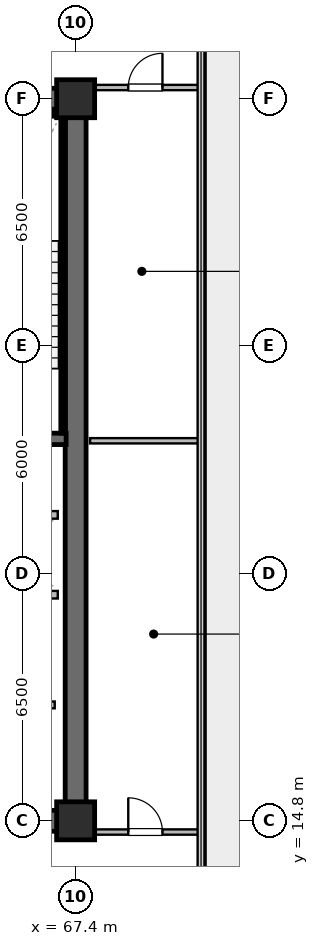
"""IFC4 building model, lengths in metres.
Left out: names, types, materials, properties, quantities, classifications, styles, units other than length and angle.
Written with IfcOpenShell. Run it as: python <this file> out.ifc"""

import sys

from ifc_helpers import new_model, si_unit, direction, frame, frame_2d, origin, origin_2d, place, context, subcontext, project, spatial, rectangle, extrude, source, transform, mapped, element, fill, save


model = new_model("IFC4")
c1 = context("Model", 3, precision=1e-05, world=origin(), true_north=direction((0.0, 1.0)))
c2 = subcontext(c1, "Body", "Model", "MODEL_VIEW")
j1 = project(units=[si_unit("LENGTHUNIT", "METRE"), si_unit("PLANEANGLEUNIT", "RADIAN")], contexts=[c1])
p1 = place(None, origin())
s1 = spatial("IfcSite", under=j1, at=p1, CompositionType="ELEMENT")
p2 = place(p1, origin())
s2 = spatial("IfcBuilding", under=s1, at=p2, CompositionType="ELEMENT")
p3 = place(p2, frame((0.0, 0.0, 196.6)))
s3 = spatial("IfcBuildingStorey", under=s2, at=p3, CompositionType="ELEMENT", Elevation=196.6)
p4 = place(p3, frame((52.325, 14.8, 0.0), z_axis=(0.0, 0.0, 1.0), x_axis=(1.0, 0.0, 0.0)))
e1 = element("IfcWall", 1, at=p4, inside=s3, PredefinedType="SHEAR", context=c2, shape_type="SweptSolid", body=[
    extrude(rectangle(XDim=15.35, YDim=0.55, at=frame_2d((7.675, 0.0))), origin(), (0.0, 0.0, 1.0), 4.5),
])
p5 = place(p3, frame((52.325, 33.8, 0.0), z_axis=(0.0, 0.0, 1.0), x_axis=(1.0, 0.0, 0.0)))
e2 = element("IfcWall", 2, at=p5, inside=s3, PredefinedType="SHEAR", context=c2, shape_type="SweptSolid", body=[
    extrude(rectangle(XDim=15.35, YDim=0.55, at=frame_2d((7.675, 0.0))), origin(), (0.0, 0.0, 1.0), 4.5),
])
p6 = place(p5, frame((6.075, 0.0, 0.0)))
e3 = element("IfcOpeningElement", 3, at=p6, cuts=e2, PredefinedType="OPENING", context=c2, shape_type="SweptSolid", body=[
    extrude(rectangle(XDim=0.95, YDim=2.15, at=frame_2d((0.475, 1.075))), frame((0.0, 0.285, 0.0), z_axis=(0.0, -1.0, 0.0), x_axis=(1.0, 0.0, 0.0)), (0.0, 0.0, 1.0), 0.57),
])
p7 = place(p5, frame((2.535, 0.0, 0.0)))
e4 = element("IfcOpeningElement", 4, at=p7, cuts=e2, PredefinedType="OPENING", context=c2, shape_type="SweptSolid", body=[
    extrude(rectangle(XDim=0.95, YDim=2.15, at=frame_2d((0.475, 1.075))), frame((0.0, 0.285, 0.0), z_axis=(0.0, -1.0, 0.0), x_axis=(1.0, 0.0, 0.0)), (0.0, 0.0, 1.0), 0.57),
])
p8 = place(p3, frame((67.4, 15.075, 0.0), z_axis=(0.0, 0.0, 1.0), x_axis=(0.0, 1.0, 0.0)))
e5 = element("IfcWall", 5, at=p8, inside=s3, PredefinedType="SHEAR", context=c2, shape_type="SweptSolid", body=[
    extrude(rectangle(XDim=18.45, YDim=0.55, at=frame_2d((9.225, 0.0))), origin(), (0.0, 0.0, 1.0), 4.5),
])
p9 = place(p3, frame((63.35, 24.85, 0.0), z_axis=(0.0, 0.0, 1.0), x_axis=(1.0, 0.0, 0.0)))
e6 = element("IfcWall", 6, at=p9, inside=s3, PredefinedType="SHEAR", context=c2, shape_type="SweptSolid", body=[
    extrude(rectangle(XDim=3.8, YDim=0.3, at=frame_2d((1.9, 0.0))), origin(), (0.0, 0.0, 1.0), 4.5),
])
p10 = place(p3, frame((63.35, 33.4, 0.0), z_axis=(0.0, 0.0, 1.0), x_axis=(1.0, 0.0, 0.0)))
e7 = element("IfcWall", 7, at=p10, inside=s3, PredefinedType="SOLIDWALL", context=c2, shape_type="SweptSolid", body=[
    extrude(rectangle(XDim=3.72, YDim=0.12, at=frame_2d((1.86, 0.0))), origin(), (0.0, 0.0, 1.0), 4.5),
])
p11 = place(p3, frame((67.07, 25.0, 0.0), z_axis=(0.0, 0.0, 1.0), x_axis=(0.0, 1.0, 0.0)))
e8 = element("IfcWall", 8, at=p11, inside=s3, PredefinedType="SOLIDWALL", context=c2, shape_type="SweptSolid", body=[
    extrude(rectangle(XDim=8.32, YDim=0.12, at=frame_2d((4.16, 0.0))), origin(), (0.0, 0.0, 1.0), 4.5),
])
m1 = source(origin(), c2, "Body", "SweptSolid", [
    extrude(rectangle(XDim=1.0, YDim=1.0, at=origin_2d()), origin(), (0.0, 0.0, 1.0), 4.8),
])
for number, where, z_axis, x_axis in (
    (9, (67.4, 14.8, 0.0), (0.0, 0.0, 1.0), (1.0, 0.0, 0.0)),
    (10, (67.4, 33.8, 0.0), (0.0, 0.0, 1.0), (1.0, 0.0, 0.0)),
):
    element("IfcColumn", number, at=place(p3, frame(where, z_axis=z_axis, x_axis=x_axis)), inside=s3, PredefinedType="COLUMN", context=c2, shape_type="MappedRepresentation", body=[
        mapped(m1, transform((0.0, 0.0, 0.0), scale=1.0)),
    ])
p12 = place(p3, frame((64.67, 20.75, 0.0), z_axis=(0.0, 0.0, 1.0), x_axis=(1.0, 0.0, 0.0)))
e11 = element("IfcWall", 11, at=p12, inside=s3, PredefinedType="SOLIDWALL", context=c2, shape_type="SweptSolid", body=[
    extrude(rectangle(XDim=2.26, YDim=0.2, at=frame_2d((1.13, 0.0))), origin(), (0.0, 0.0, 1.0), 4.5),
])
p13 = place(p12, frame((0.58, 0.0, 0.0)))
e12 = element("IfcOpeningElement", 12, at=p13, cuts=e11, PredefinedType="OPENING", context=c2, shape_type="SweptSolid", body=[
    extrude(rectangle(XDim=1.1, YDim=2.22, at=frame_2d((0.55, 1.11))), frame((0.0, 0.11, 0.0), z_axis=(0.0, -1.0, 0.0), x_axis=(1.0, 0.0, 0.0)), (0.0, 0.0, 1.0), 0.22),
])
p14 = place(p3, frame((64.67, 22.85, 0.0), z_axis=(0.0, 0.0, 1.0), x_axis=(1.0, 0.0, 0.0)))
e13 = element("IfcWall", 13, at=p14, inside=s3, PredefinedType="SOLIDWALL", context=c2, shape_type="SweptSolid", body=[
    extrude(rectangle(XDim=2.26, YDim=0.2, at=frame_2d((1.13, 0.0))), origin(), (0.0, 0.0, 1.0), 4.5),
])
p15 = place(p3, frame((63.35, 17.85, 0.0), z_axis=(0.0, 0.0, 1.0), x_axis=(1.0, 0.0, 0.0)))
e14 = element("IfcWall", 14, at=p15, inside=s3, PredefinedType="SOLIDWALL", context=c2, shape_type="SweptSolid", body=[
    extrude(rectangle(XDim=3.5, YDim=0.18, at=frame_2d((1.75, 0.0))), origin(), (0.0, 0.0, 1.0), 4.5),
])
p16 = place(p15, frame((1.275, 0.0, 0.0)))
e15 = element("IfcOpeningElement", 15, at=p16, cuts=e14, PredefinedType="OPENING", context=c2, shape_type="SweptSolid", body=[
    extrude(rectangle(XDim=0.95, YDim=2.15, at=frame_2d((0.475, 1.075))), frame((0.0, 0.1, 0.0), z_axis=(0.0, -1.0, 0.0), x_axis=(1.0, 0.0, 0.0)), (0.0, 0.0, 1.0), 0.2),
])
p17 = place(p3, frame((67.78, 24.8, 0.0), z_axis=(0.0, 0.0, 1.0), x_axis=(1.0, 0.0, 0.0)))
e16 = element("IfcWall", 16, at=p17, inside=s3, PredefinedType="PARTITIONING", context=c2, shape_type="SweptSolid", body=[
    extrude(rectangle(XDim=2.91, YDim=0.14, at=frame_2d((1.455, 0.0))), origin(), (0.0, 0.0, 1.0), 4.5),
])
p18 = place(p3, frame((67.78, 14.505, 0.0), z_axis=(0.0, 0.0, 1.0), x_axis=(1.0, 0.0, 0.0)))
e17 = element("IfcWall", 17, at=p18, inside=s3, PredefinedType="PARTITIONING", context=c2, shape_type="SweptSolid", body=[
    extrude(rectangle(XDim=2.91, YDim=0.14, at=frame_2d((1.455, 0.0))), origin(), (0.0, 0.0, 1.0), 4.5),
])
p19 = place(p18, frame((1.005, 0.0, 0.0)))
e18 = element("IfcOpeningElement", 18, at=p19, cuts=e17, PredefinedType="OPENING", context=c2, shape_type="SweptSolid", body=[
    extrude(rectangle(XDim=0.9, YDim=2.1, at=frame_2d((0.45, 1.05))), frame((0.0, 0.08, 0.0), z_axis=(0.0, -1.0, 0.0), x_axis=(1.0, 0.0, 0.0)), (0.0, 0.0, 1.0), 0.16),
])
p20 = place(p3, frame((67.78, 34.095, 0.0), z_axis=(0.0, 0.0, 1.0), x_axis=(1.0, 0.0, 0.0)))
e19 = element("IfcWall", 19, at=p20, inside=s3, PredefinedType="PARTITIONING", context=c2, shape_type="SweptSolid", body=[
    extrude(rectangle(XDim=2.91, YDim=0.14, at=frame_2d((1.455, 0.0))), origin(), (0.0, 0.0, 1.0), 4.5),
])
p21 = place(p20, frame((1.005, 0.0, 0.0)))
e20 = element("IfcOpeningElement", 20, at=p21, cuts=e19, PredefinedType="OPENING", context=c2, shape_type="SweptSolid", body=[
    extrude(rectangle(XDim=0.9, YDim=2.1, at=frame_2d((0.45, 1.05))), frame((0.0, 0.08, 0.0), z_axis=(0.0, -1.0, 0.0), x_axis=(1.0, 0.0, 0.0)), (0.0, 0.0, 1.0), 0.16),
])
m2 = source(origin(), c2, "Body", "SweptSolid", [
    extrude(rectangle(XDim=0.9, YDim=2.1, at=frame_2d((0.45, 1.05))), frame((0.0, 0.025, 0.0), z_axis=(0.0, -1.0, 0.0), x_axis=(1.0, 0.0, 0.0)), (0.0, 0.0, 1.0), 0.05),
])
p22 = place(p19, origin())
e21 = element("IfcDoor", 21, at=p22, inside=s3, OperationType="SINGLE_SWING_LEFT", PredefinedType="DOOR", context=c2, shape_type="MappedRepresentation", body=[
    mapped(m2, transform((0.0, 0.0, 0.0), scale=1.0)),
])
fill(e18, e21)
p23 = place(p21, origin())
e22 = element("IfcDoor", 22, at=p23, inside=s3, OperationType="SINGLE_SWING_RIGHT", PredefinedType="DOOR", context=c2, shape_type="MappedRepresentation", body=[
    mapped(m2, transform((0.0, 0.0, 0.0), scale=1.0)),
])
fill(e20, e22)
save(model, sys.argv[1])
